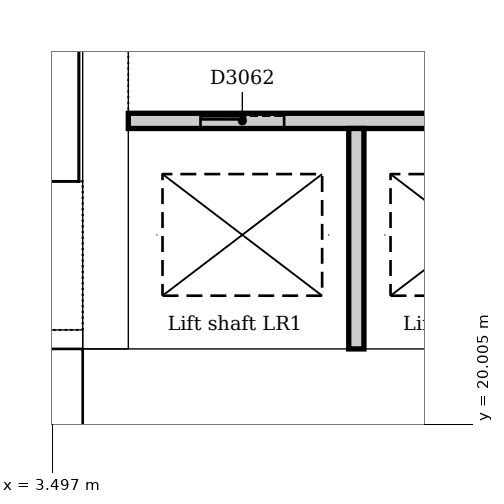
"""IFC4 building model, lengths in metres.
Left out: names, types, materials, properties, quantities, classifications, styles, units other than length and angle.
Written with IfcOpenShell. Run it as: python <this file> out.ifc"""

import sys

from ifc_helpers import new_model, si_unit, direction, frame, frame_2d, origin, place, context, subcontext, project, spatial, rectangle, extrude, element, fill, save


model = new_model("IFC4")
c1 = context("Model", 3, precision=1e-05, world=origin(), true_north=direction((0.0, 1.0)))
c2 = subcontext(c1, "Body", "Model", "MODEL_VIEW")
j1 = project(units=[si_unit("LENGTHUNIT", "METRE"), si_unit("PLANEANGLEUNIT", "RADIAN")], contexts=[c1])
p1 = place(None, origin())
s1 = spatial("IfcSite", under=j1, at=p1, CompositionType="ELEMENT")
p2 = place(p1, origin())
s2 = spatial("IfcBuilding", under=s1, at=p2, CompositionType="ELEMENT")
p3 = place(p2, origin())
s3 = spatial("IfcBuildingStorey", under=s2, at=p3, CompositionType="ELEMENT", Elevation=0.0)
p4 = place(p3, frame((3.9, 20.4, 0.0), z_axis=(0.0, 0.0, 1.0), x_axis=(1.0, 0.0, 0.0)))
e1 = element("IfcWall", 1, at=p4, inside=s3, PredefinedType="SOLIDWALL", context=c2, shape_type="SweptSolid", body=[
    extrude(rectangle(XDim=19.8, YDim=1.2, at=frame_2d((9.9, 0.0))), origin(), (0.0, 0.0, 1.0), 6.0),
])
p5 = place(p3, frame((4.2, 31.5, 0.0), z_axis=(0.0, 0.0, 1.0), x_axis=(0.0, -1.0, 0.0)))
e2 = element("IfcWall", 2, at=p5, inside=s3, PredefinedType="SOLIDWALL", context=c2, shape_type="SweptSolid", body=[
    extrude(rectangle(XDim=10.5, YDim=0.6, at=frame_2d((5.25, 0.0))), origin(), (0.0, 0.0, 1.0), 6.0),
])
p6 = place(p5, frame((4.25, 0.0, 0.0)))
e3 = element("IfcOpeningElement", 3, at=p6, cuts=e2, PredefinedType="OPENING", context=c2, shape_type="SweptSolid", body=[
    extrude(rectangle(XDim=1.0, YDim=2.1, at=frame_2d((0.5, 1.05))), frame((0.0, 0.31, 0.0), z_axis=(0.0, -1.0, 0.0), x_axis=(1.0, 0.0, 0.0)), (0.0, 0.0, 1.0), 0.62),
])
p7 = place(p3, frame((0.36, 21.125, 0.0), z_axis=(0.0, 0.0, 1.0), x_axis=(1.0, 0.0, 0.0)))
e4 = element("IfcWall", 4, at=p7, inside=s3, PredefinedType="SOLIDWALL", context=c2, shape_type="SweptSolid", body=[
    extrude(rectangle(XDim=3.54, YDim=0.25, at=frame_2d((1.77, 0.0))), origin(), (0.0, 0.0, 1.0), 6.0),
])
p8 = place(p3, frame((4.5, 24.0, 0.0), z_axis=(0.0, 0.0, 1.0), x_axis=(1.0, 0.0, 0.0)))
e5 = element("IfcWall", 5, at=p8, inside=s3, PredefinedType="PARTITIONING", context=c2, shape_type="SweptSolid", body=[
    extrude(rectangle(XDim=18.0, YDim=0.2, at=frame_2d((9.0, 0.0))), origin(), (0.0, 0.0, 1.0), 5.7),
])
p9 = place(p8, frame((0.95, 0.0, 0.0)))
e6 = element("IfcOpeningElement", 6, at=p9, cuts=e5, PredefinedType="OPENING", context=c2, shape_type="SweptSolid", body=[
    extrude(rectangle(XDim=1.1, YDim=2.1, at=frame_2d((0.55, 1.05))), frame((0.0, 0.11, 0.0), z_axis=(0.0, -1.0, 0.0), x_axis=(1.0, 0.0, 0.0)), (0.0, 0.0, 1.0), 0.22),
])
p10 = place(p8, frame((3.95, 0.0, 0.0)))
e7 = element("IfcOpeningElement", 7, at=p10, cuts=e5, PredefinedType="OPENING", context=c2, shape_type="SweptSolid", body=[
    extrude(rectangle(XDim=1.1, YDim=2.1, at=frame_2d((0.55, 1.05))), frame((0.0, 0.11, 0.0), z_axis=(0.0, -1.0, 0.0), x_axis=(1.0, 0.0, 0.0)), (0.0, 0.0, 1.0), 0.22),
])
p11 = place(p8, frame((6.95, 0.0, 0.0)))
e8 = element("IfcOpeningElement", 8, at=p11, cuts=e5, PredefinedType="OPENING", context=c2, shape_type="SweptSolid", body=[
    extrude(rectangle(XDim=1.1, YDim=2.1, at=frame_2d((0.55, 1.05))), frame((0.0, 0.11, 0.0), z_axis=(0.0, -1.0, 0.0), x_axis=(1.0, 0.0, 0.0)), (0.0, 0.0, 1.0), 0.22),
])
p12 = place(p8, frame((9.95, 0.0, 0.0)))
e9 = element("IfcOpeningElement", 9, at=p12, cuts=e5, PredefinedType="OPENING", context=c2, shape_type="SweptSolid", body=[
    extrude(rectangle(XDim=1.1, YDim=2.1, at=frame_2d((0.55, 1.05))), frame((0.0, 0.11, 0.0), z_axis=(0.0, -1.0, 0.0), x_axis=(1.0, 0.0, 0.0)), (0.0, 0.0, 1.0), 0.22),
])
p13 = place(p8, frame((12.95, 0.0, 0.0)))
e10 = element("IfcOpeningElement", 10, at=p13, cuts=e5, PredefinedType="OPENING", context=c2, shape_type="SweptSolid", body=[
    extrude(rectangle(XDim=1.1, YDim=2.1, at=frame_2d((0.55, 1.05))), frame((0.0, 0.11, 0.0), z_axis=(0.0, -1.0, 0.0), x_axis=(1.0, 0.0, 0.0)), (0.0, 0.0, 1.0), 0.22),
])
p14 = place(p8, frame((15.95, 0.0, 0.0)))
e11 = element("IfcOpeningElement", 11, at=p14, cuts=e5, PredefinedType="OPENING", context=c2, shape_type="SweptSolid", body=[
    extrude(rectangle(XDim=1.1, YDim=2.1, at=frame_2d((0.55, 1.05))), frame((0.0, 0.11, 0.0), z_axis=(0.0, -1.0, 0.0), x_axis=(1.0, 0.0, 0.0)), (0.0, 0.0, 1.0), 0.22),
])
p15 = place(p3, frame((7.5, 21.0, 0.0), z_axis=(0.0, 0.0, 1.0), x_axis=(0.0, 1.0, 0.0)))
e12 = element("IfcWall", 12, at=p15, inside=s3, PredefinedType="PARTITIONING", context=c2, shape_type="SweptSolid", body=[
    extrude(rectangle(XDim=2.9, YDim=0.2, at=frame_2d((1.45, 0.0))), origin(), (0.0, 0.0, 1.0), 5.7),
])
p16 = place(p9, origin())
e13 = element("IfcDoor", 13, at=p16, inside=s3, OperationType="SLIDING_TO_LEFT", PredefinedType="DOOR", context=c2, shape_type="SweptSolid", body=[
    extrude(rectangle(XDim=1.1, YDim=2.1, at=frame_2d((0.55, 1.05))), frame((0.0, 0.025, 0.0), z_axis=(0.0, -1.0, 0.0), x_axis=(1.0, 0.0, 0.0)), (0.0, 0.0, 1.0), 0.05),
])
fill(e6, e13)
save(model, sys.argv[1])
